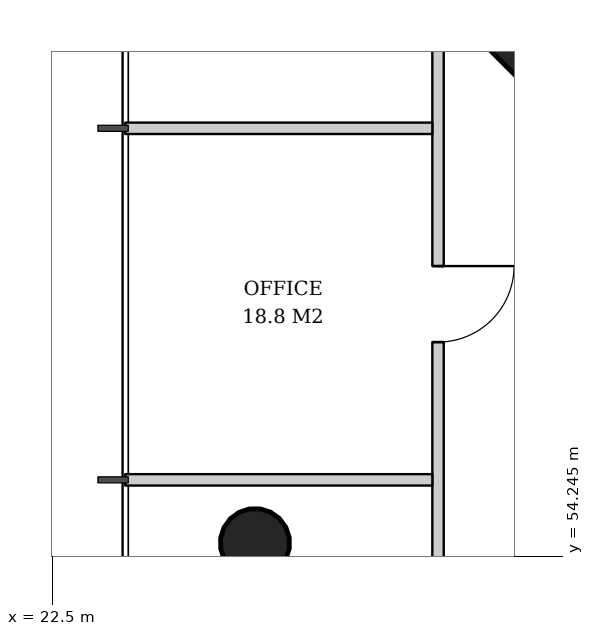
"""IFC4 building model, lengths in metres.
Left out: names, types, materials, properties, quantities, classifications, styles, units other than length and angle.
Written with IfcOpenShell. Run it as: python <this file> out.ifc"""

import sys

from ifc_helpers import new_model, si_unit, direction, frame, frame_2d, origin, origin_2d, place, context, subcontext, project, spatial, rectangle, hollow_circle, extrude, element, fill, save


model = new_model("IFC4")
c1 = context("Model", 3, precision=1e-05, world=origin(), true_north=direction((0.0, 1.0)))
c2 = subcontext(c1, "Body", "Model", "MODEL_VIEW")
j1 = project(units=[si_unit("LENGTHUNIT", "METRE"), si_unit("PLANEANGLEUNIT", "RADIAN")], contexts=[c1])
p1 = place(None, origin())
s1 = spatial("IfcSite", under=j1, at=p1, CompositionType="ELEMENT")
p2 = place(p1, origin())
s2 = spatial("IfcBuilding", under=s1, at=p2, CompositionType="ELEMENT")
p3 = place(p2, frame((0.0, 0.0, 150.2)))
s3 = spatial("IfcBuildingStorey", under=s2, at=p3, CompositionType="ELEMENT", Elevation=150.2)
p4 = place(p3, frame((29.229, 61.771, 0.0), z_axis=(0.031962158256, -0.031962158256, 0.998977898093), x_axis=(0.707106781187, 0.707106781187, 0.0)))
e1 = element("IfcColumn", 1, at=p4, inside=s3, PredefinedType="COLUMN", context=c2, shape_type="SweptSolid", body=[
    extrude(rectangle(XDim=2.6, YDim=2.6, at=origin_2d()), origin(), (0.0, 0.0, 1.0), 3.804),
])
p5 = place(p3, frame((25.129, 54.436, 0.0), z_axis=(0.031910269556, -0.015987237665, 0.999362868496), x_axis=(0.447933021895, 0.894067115991, 0.0)))
e2 = element("IfcColumn", 2, at=p5, inside=s3, PredefinedType="COLUMN", context=c2, shape_type="SweptSolid", body=[
    extrude(hollow_circle(Radius=0.457, WallThickness=0.03, at=origin_2d()), origin(), (0.0, 0.0, 1.0), 3.802),
])
p6 = place(p3, frame((27.575, 61.511, 0.0), z_axis=(0.0, 0.0, 1.0), x_axis=(0.0, -1.0, 0.0)))
e3 = element("IfcWall", 3, at=p6, inside=s3, PredefinedType="PARTITIONING", context=c2, shape_type="SweptSolid", body=[
    extrude(rectangle(XDim=31.023, YDim=0.15, at=frame_2d((15.511, 0.0))), origin(), (0.0, 0.0, 1.0), 2.72),
])
p7 = place(p6, frame((3.449, 0.0, 0.0)))
e4 = element("IfcOpeningElement", 4, at=p7, cuts=e3, PredefinedType="OPENING", context=c2, shape_type="SweptSolid", body=[
    extrude(rectangle(XDim=1.0, YDim=2.1, at=frame_2d((0.5, 1.05))), frame((0.0, 0.085, 0.0), z_axis=(0.0, -1.0, 0.0), x_axis=(1.0, 0.0, 0.0)), (0.0, 0.0, 1.0), 0.17),
])
p8 = place(p6, frame((8.074, 0.0, 0.0)))
e5 = element("IfcOpeningElement", 5, at=p8, cuts=e3, PredefinedType="OPENING", context=c2, shape_type="SweptSolid", body=[
    extrude(rectangle(XDim=1.0, YDim=2.1, at=frame_2d((0.5, 1.05))), frame((0.0, 0.085, 0.0), z_axis=(0.0, -1.0, 0.0), x_axis=(1.0, 0.0, 0.0)), (0.0, 0.0, 1.0), 0.17),
])
p9 = place(p6, frame((12.699, 0.0, 0.0)))
e6 = element("IfcOpeningElement", 6, at=p9, cuts=e3, PredefinedType="OPENING", context=c2, shape_type="SweptSolid", body=[
    extrude(rectangle(XDim=1.0, YDim=2.1, at=frame_2d((0.5, 1.05))), frame((0.0, 0.085, 0.0), z_axis=(0.0, -1.0, 0.0), x_axis=(1.0, 0.0, 0.0)), (0.0, 0.0, 1.0), 0.17),
])
p10 = place(p6, frame((17.424, 0.0, 0.0)))
e7 = element("IfcOpeningElement", 7, at=p10, cuts=e3, PredefinedType="OPENING", context=c2, shape_type="SweptSolid", body=[
    extrude(rectangle(XDim=0.8, YDim=2.1, at=frame_2d((0.4, 1.05))), frame((0.0, 0.085, 0.0), z_axis=(0.0, -1.0, 0.0), x_axis=(1.0, 0.0, 0.0)), (0.0, 0.0, 1.0), 0.17),
])
p11 = place(p6, frame((21.949, 0.0, 0.0)))
e8 = element("IfcOpeningElement", 8, at=p11, cuts=e3, PredefinedType="OPENING", context=c2, shape_type="SweptSolid", body=[
    extrude(rectangle(XDim=1.0, YDim=2.1, at=frame_2d((0.5, 1.05))), frame((0.0, 0.085, 0.0), z_axis=(0.0, -1.0, 0.0), x_axis=(1.0, 0.0, 0.0)), (0.0, 0.0, 1.0), 0.17),
])
p12 = place(p6, frame((26.674, 0.0, 0.0)))
e9 = element("IfcOpeningElement", 9, at=p12, cuts=e3, PredefinedType="OPENING", context=c2, shape_type="SweptSolid", body=[
    extrude(rectangle(XDim=0.8, YDim=2.1, at=frame_2d((0.4, 1.05))), frame((0.0, 0.085, 0.0), z_axis=(0.0, -1.0, 0.0), x_axis=(1.0, 0.0, 0.0)), (0.0, 0.0, 1.0), 0.17),
])
for number, where, z_axis, x_axis in (
    (10, (27.5, 59.875, 0.0), (0.0, 0.0, 1.0), (-1.0, 0.0, 0.0)),
    (11, (27.5, 55.25, 0.0), (0.0, 0.0, 1.0), (-1.0, 0.0, 0.0)),
):
    element("IfcWall", number, at=place(p3, frame(where, z_axis=z_axis, x_axis=x_axis)), inside=s3, PredefinedType="PARTITIONING", context=c2, shape_type="SweptSolid", body=[
        extrude(rectangle(XDim=4.04, YDim=0.15, at=frame_2d((2.02, 0.0))), origin(), (0.0, 0.0, 1.0), 2.82),
    ])
p13 = place(p7, origin())
e12 = element("IfcDoor", 12, at=p13, inside=s3, OperationType="SINGLE_SWING_LEFT", PredefinedType="DOOR", context=c2, shape_type="SweptSolid", body=[
    extrude(rectangle(XDim=1.0, YDim=2.1, at=frame_2d((0.5, 1.05))), frame((0.0, 0.025, 0.0), z_axis=(0.0, -1.0, 0.0), x_axis=(1.0, 0.0, 0.0)), (0.0, 0.0, 1.0), 0.05),
])
fill(e4, e12)
save(model, sys.argv[1])
